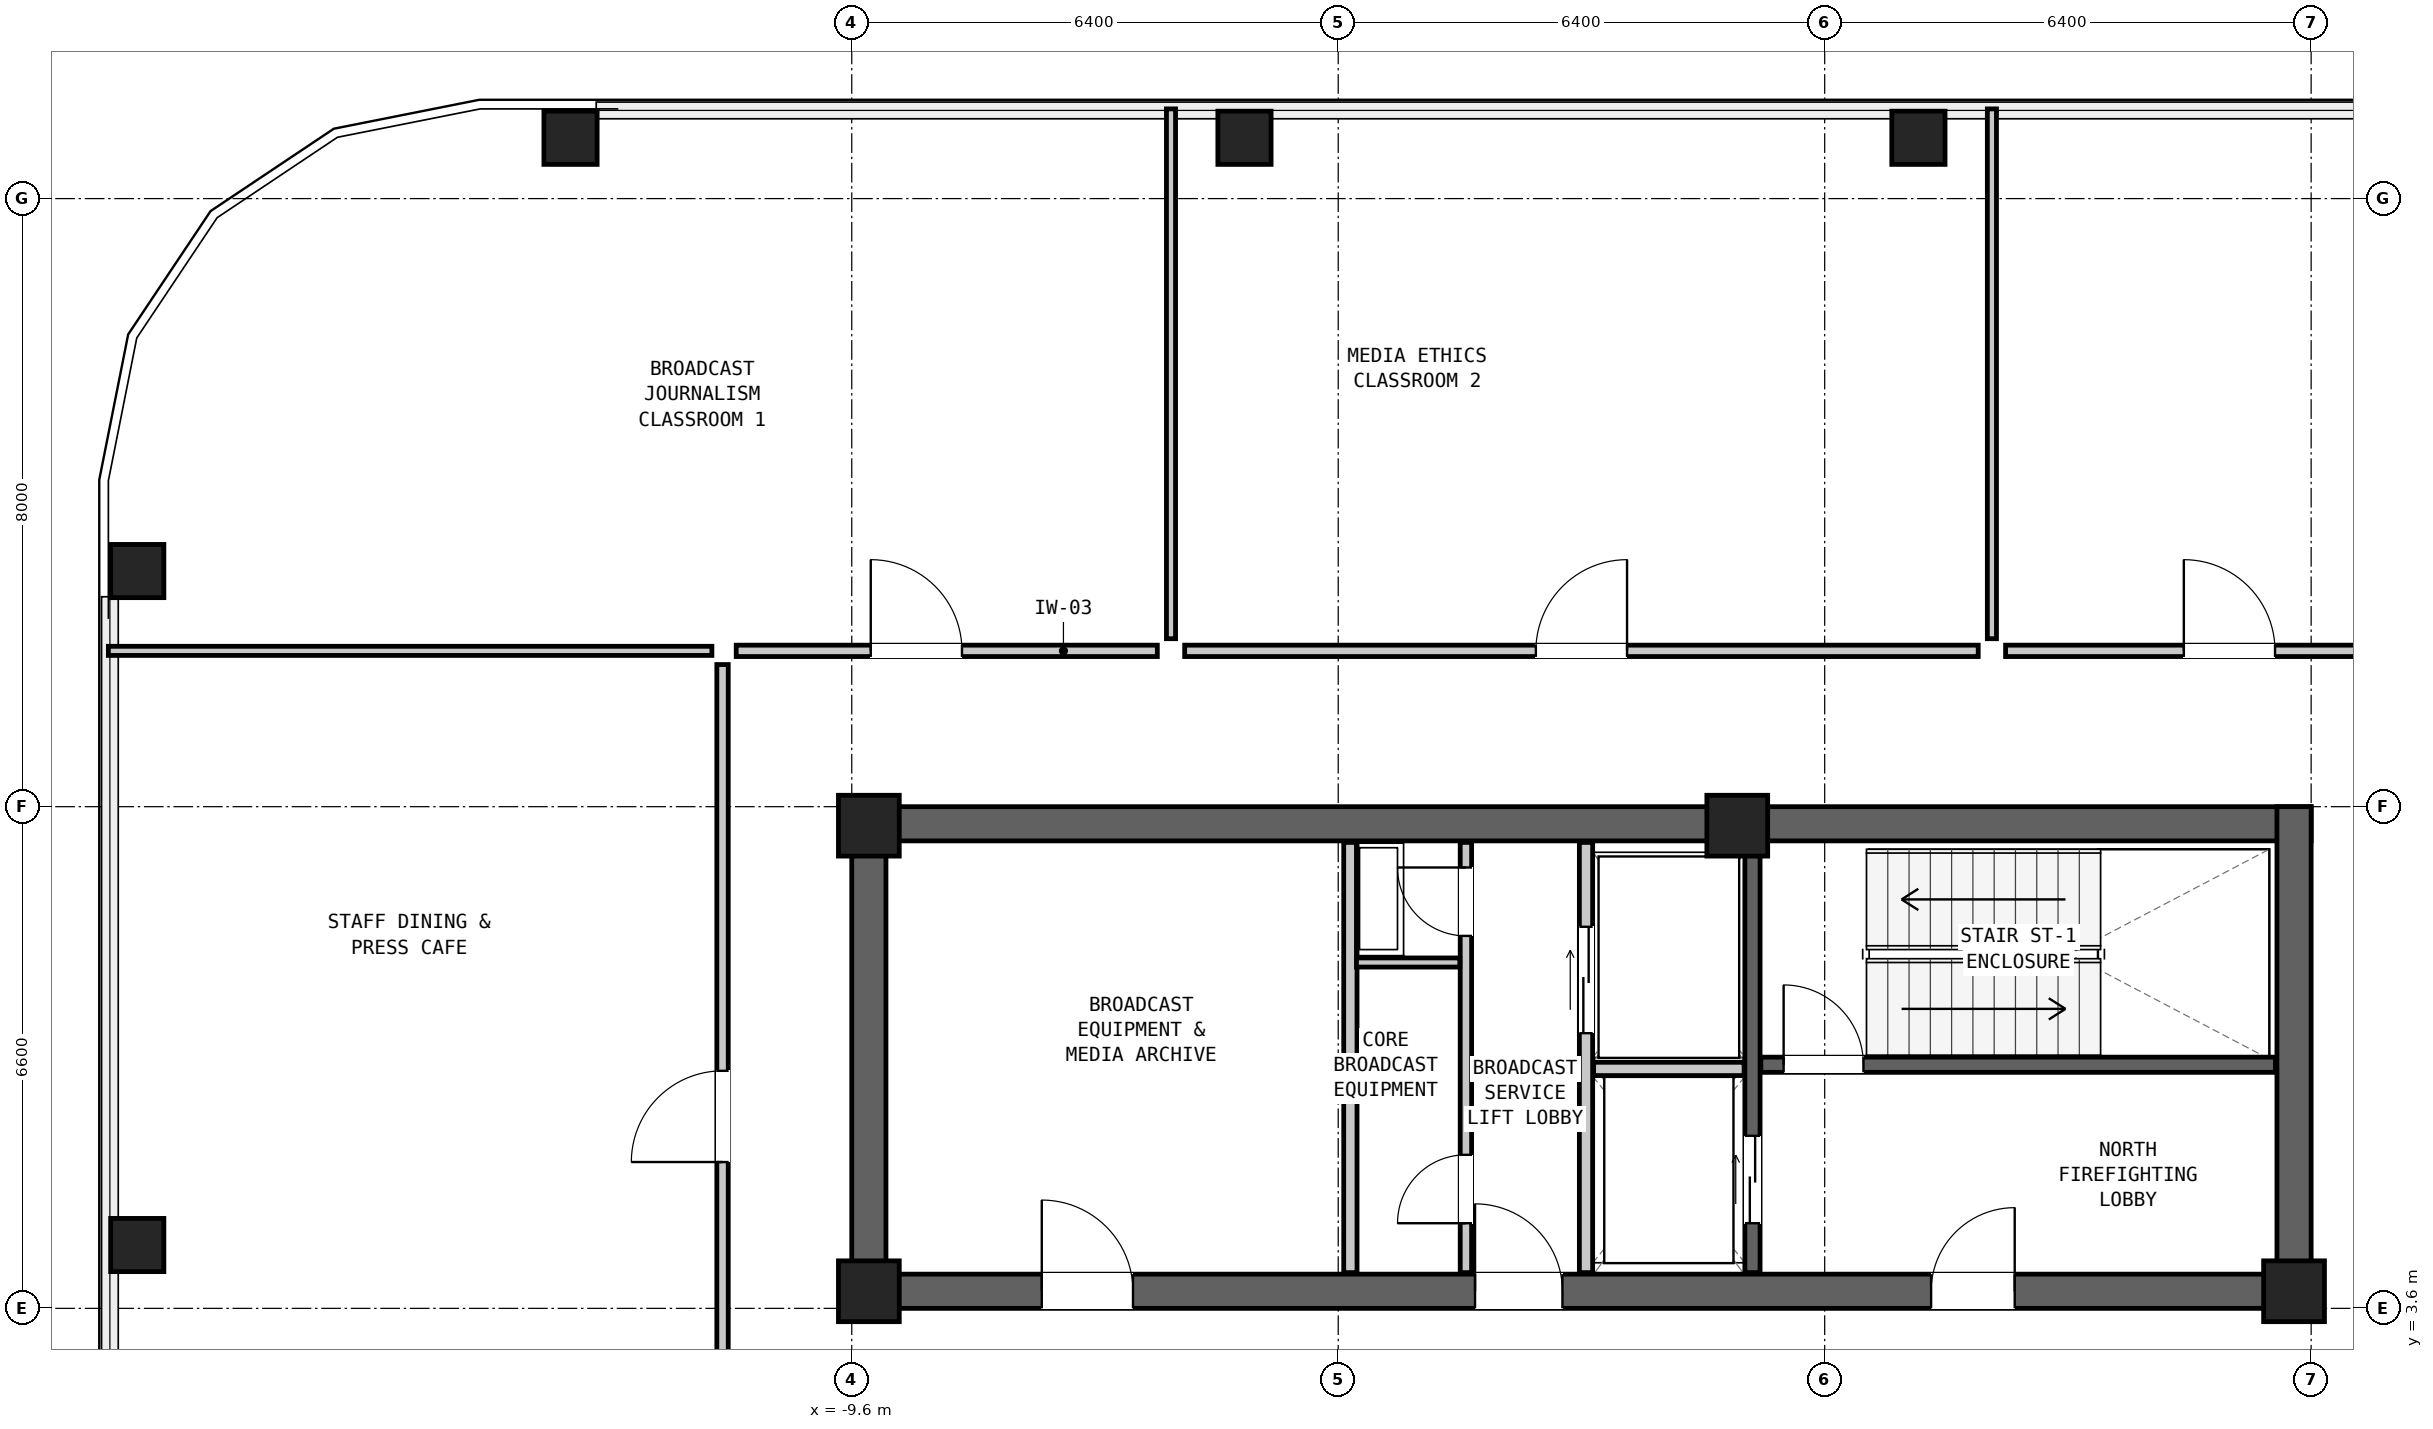
"""IFC4 building model, lengths in metres.
Left out: names, types, materials, properties, quantities, classifications, styles, units other than length and angle.
Written with IfcOpenShell. Run it as: python <this file> out.ifc"""

import sys

from ifc_helpers import new_model, si_unit, direction, frame, frame_2d, origin, origin_2d, place, context, subcontext, project, spatial, rectangle, hollow_rectangle, extrude, element, fill, save


model = new_model("IFC4")
c1 = context("Model", 3, precision=1e-05, world=origin(), true_north=direction((0.0, 1.0)))
c2 = subcontext(c1, "Body", "Model", "MODEL_VIEW")
j1 = project(units=[si_unit("LENGTHUNIT", "METRE"), si_unit("PLANEANGLEUNIT", "RADIAN")], contexts=[c1])
p1 = place(None, origin())
s1 = spatial("IfcSite", under=j1, at=p1, CompositionType="ELEMENT")
p2 = place(p1, origin())
s2 = spatial("IfcBuilding", under=s1, at=p2, CompositionType="ELEMENT")
p3 = place(p2, frame((0.0, 0.0, 226.95)))
s3 = spatial("IfcBuildingStorey", under=s2, at=p3, CompositionType="ELEMENT", Elevation=226.95)
p4 = place(p3, frame((-9.6, 9.975, 0.0), z_axis=(0.0, 0.0, 1.0), x_axis=(1.0, 0.0, 0.0)))
e1 = element("IfcWall", 1, at=p4, inside=s3, PredefinedType="SHEAR", context=c2, shape_type="SweptSolid", body=[
    extrude(rectangle(XDim=19.2, YDim=0.45, at=frame_2d((9.6, 0.0))), origin(), (0.0, 0.0, 1.0), 4.35),
])
p5 = place(p3, frame((-9.6, 3.825, 0.0), z_axis=(0.0, 0.0, 1.0), x_axis=(1.0, 0.0, 0.0)))
e2 = element("IfcWall", 2, at=p5, inside=s3, PredefinedType="SHEAR", context=c2, shape_type="SweptSolid", body=[
    extrude(rectangle(XDim=19.2, YDim=0.45, at=frame_2d((9.6, 0.0))), origin(), (0.0, 0.0, 1.0), 4.35),
])
p6 = place(p5, frame((14.2, 0.0, 0.0)))
e3 = element("IfcOpeningElement", 3, at=p6, cuts=e2, PredefinedType="OPENING", context=c2, shape_type="SweptSolid", body=[
    extrude(rectangle(XDim=1.1, YDim=2.08, at=frame_2d((0.55, 1.04))), frame((0.0, 0.237, 0.0), z_axis=(0.0, -1.0, 0.0), x_axis=(1.0, 0.0, 0.0)), (0.0, 0.0, 1.0), 0.474),
])
p7 = place(p5, frame((8.2, 0.0, 0.0)))
e4 = element("IfcOpeningElement", 4, at=p7, cuts=e2, PredefinedType="OPENING", context=c2, shape_type="SweptSolid", body=[
    extrude(rectangle(XDim=1.15, YDim=2.1, at=frame_2d((0.575, 1.05))), frame((0.0, 0.237, 0.0), z_axis=(0.0, -1.0, 0.0), x_axis=(1.0, 0.0, 0.0)), (0.0, 0.0, 1.0), 0.474),
])
p8 = place(p5, frame((2.5, 0.0, 0.0)))
e5 = element("IfcOpeningElement", 5, at=p8, cuts=e2, PredefinedType="OPENING", context=c2, shape_type="SweptSolid", body=[
    extrude(rectangle(XDim=1.2, YDim=2.1, at=frame_2d((0.6, 1.05))), frame((0.0, 0.237, 0.0), z_axis=(0.0, -1.0, 0.0), x_axis=(1.0, 0.0, 0.0)), (0.0, 0.0, 1.0), 0.474),
])
for number, where, z_axis, x_axis in (
    (6, (-9.375, 3.6, 0.0), (0.0, 0.0, 1.0), (0.0, 1.0, 0.0)),
    (7, (9.375, 3.6, 0.0), (0.0, 0.0, 1.0), (0.0, 1.0, 0.0)),
):
    element("IfcWall", number, at=place(p3, frame(where, z_axis=z_axis, x_axis=x_axis)), inside=s3, PredefinedType="SHEAR", context=c2, shape_type="SweptSolid", body=[
        extrude(rectangle(XDim=6.6, YDim=0.45, at=frame_2d((3.3, 0.0))), origin(), (0.0, 0.0, 1.0), 4.35),
    ])
for number, where, z_axis, x_axis in (
    (8, (4.433, 19.0, 0.0), (0.0, 0.0, 1.0), (1.0, 0.0, 0.0)),
    (9, (-4.433, 19.0, 0.0), (0.0, 0.0, 1.0), (1.0, 0.0, 0.0)),
    (10, (-13.3, 19.0, 0.0), (0.0, 0.0, 1.0), (1.0, 0.0, 0.0)),
    (11, (-19.0, 13.3, 0.0), (0.0, 0.0, 1.0), (0.0, 1.0, 0.0)),
    (12, (-19.0, 4.433, 0.0), (0.0, 0.0, 1.0), (0.0, 1.0, 0.0)),
):
    element("IfcColumn", number, at=place(p3, frame(where, z_axis=z_axis, x_axis=x_axis)), inside=s3, PredefinedType="COLUMN", context=c2, shape_type="SweptSolid", body=[
        extrude(hollow_rectangle(XDim=0.7, YDim=0.7, WallThickness=0.045, at=origin_2d()), origin(), (0.0, 0.0, 1.0), 4.35),
    ])
for number, where, z_axis, x_axis in (
    (13, (-9.375, 9.95, 0.0), (0.0, 0.0, 1.0), (1.0, 0.0, 0.0)),
    (14, (2.05, 9.95, 0.0), (0.0, 0.0, 1.0), (1.0, 0.0, 0.0)),
    (15, (-9.375, 3.825, 0.0), (0.0, 0.0, 1.0), (1.0, 0.0, 0.0)),
    (16, (9.375, 3.825, 0.0), (0.0, 0.0, 1.0), (1.0, 0.0, 0.0)),
):
    element("IfcColumn", number, at=place(p3, frame(where, z_axis=z_axis, x_axis=x_axis)), inside=s3, PredefinedType="COLUMN", context=c2, shape_type="SweptSolid", body=[
        extrude(rectangle(XDim=0.8, YDim=0.8, at=origin_2d()), origin(), (0.0, 0.0, 1.0), 4.35),
    ])
p9 = place(p3, frame((2.36, 6.805, 0.0), z_axis=(0.0, 0.0, 1.0), x_axis=(1.0, 0.0, 0.0)))
e17 = element("IfcWall", 17, at=p9, inside=s3, PredefinedType="SHEAR", context=c2, shape_type="SweptSolid", body=[
    extrude(rectangle(XDim=6.77, YDim=0.2, at=frame_2d((3.385, 0.0))), origin(), (0.0, 0.0, 1.0), 4.07),
])
p10 = place(p9, frame((0.3, 0.0, 0.0)))
e18 = element("IfcOpeningElement", 18, at=p10, cuts=e17, PredefinedType="OPENING", context=c2, shape_type="SweptSolid", body=[
    extrude(rectangle(XDim=1.05, YDim=2.08, at=frame_2d((0.525, 1.04))), frame((0.0, 0.112, 0.0), z_axis=(0.0, -1.0, 0.0), x_axis=(1.0, 0.0, 0.0)), (0.0, 0.0, 1.0), 0.224),
])
p11 = place(p3, frame((2.25, 4.07, 0.0), z_axis=(0.0, 0.0, 1.0), x_axis=(0.0, 1.0, 0.0)))
e19 = element("IfcWall", 19, at=p11, inside=s3, PredefinedType="SHEAR", context=c2, shape_type="SweptSolid", body=[
    extrude(rectangle(XDim=5.66, YDim=0.2, at=frame_2d((2.83, 0.0))), origin(), (0.0, 0.0, 1.0), 4.07),
])
p12 = place(p11, frame((0.65, 0.0, 0.0)))
e20 = element("IfcOpeningElement", 20, at=p12, cuts=e19, PredefinedType="OPENING", context=c2, shape_type="SweptSolid", body=[
    extrude(rectangle(XDim=1.15, YDim=2.08, at=frame_2d((0.575, 1.04))), frame((0.0, 0.112, 0.0), z_axis=(0.0, -1.0, 0.0), x_axis=(1.0, 0.0, 0.0)), (0.0, 0.0, 1.0), 0.224),
])
p13 = place(p3, frame((0.06, 4.07, 0.0), z_axis=(0.0, 0.0, 1.0), x_axis=(0.0, 1.0, 0.0)))
e21 = element("IfcWall", 21, at=p13, inside=s3, PredefinedType="PARTITIONING", context=c2, shape_type="SweptSolid", body=[
    extrude(rectangle(XDim=5.66, YDim=0.175, at=frame_2d((2.83, 0.0))), origin(), (0.0, 0.0, 1.0), 4.07),
])
p14 = place(p13, frame((3.15, 0.0, 0.0)))
e22 = element("IfcOpeningElement", 22, at=p14, cuts=e21, PredefinedType="OPENING", context=c2, shape_type="SweptSolid", body=[
    extrude(rectangle(XDim=1.4, YDim=2.12, at=frame_2d((0.7, 1.06))), frame((0.0, 0.1, 0.0), z_axis=(0.0, -1.0, 0.0), x_axis=(1.0, 0.0, 0.0)), (0.0, 0.0, 1.0), 0.199),
])
p15 = place(p3, frame((0.16, 6.75, 0.0), z_axis=(0.0, 0.0, 1.0), x_axis=(1.0, 0.0, 0.0)))
e23 = element("IfcWall", 23, at=p15, inside=s3, PredefinedType="PARTITIONING", context=c2, shape_type="SweptSolid", body=[
    extrude(rectangle(XDim=1.98, YDim=0.175, at=frame_2d((0.99, 0.0))), origin(), (0.0, 0.0, 1.0), 4.07),
])
p16 = place(p3, frame((-3.04, 4.07, 0.0), z_axis=(0.0, 0.0, 1.0), x_axis=(0.0, 1.0, 0.0)))
e24 = element("IfcWall", 24, at=p16, inside=s3, PredefinedType="PARTITIONING", context=c2, shape_type="SweptSolid", body=[
    extrude(rectangle(XDim=5.66, YDim=0.175, at=frame_2d((2.83, 0.0))), origin(), (0.0, 0.0, 1.0), 4.07),
])
p17 = place(p3, frame((-1.52, 4.07, 0.0), z_axis=(0.0, 0.0, 1.0), x_axis=(0.0, 1.0, 0.0)))
e25 = element("IfcWall", 25, at=p17, inside=s3, PredefinedType="PARTITIONING", context=c2, shape_type="SweptSolid", body=[
    extrude(rectangle(XDim=5.66, YDim=0.15, at=frame_2d((2.83, 0.0))), origin(), (0.0, 0.0, 1.0), 4.07),
])
p18 = place(p17, frame((4.43, 0.0, 0.0)))
e26 = element("IfcOpeningElement", 26, at=p18, cuts=e25, PredefinedType="OPENING", context=c2, shape_type="SweptSolid", body=[
    extrude(rectangle(XDim=0.9, YDim=2.05, at=frame_2d((0.45, 1.025))), frame((0.0, 0.087, 0.0), z_axis=(0.0, -1.0, 0.0), x_axis=(1.0, 0.0, 0.0)), (0.0, 0.0, 1.0), 0.174),
])
p19 = place(p17, frame((0.65, 0.0, 0.0)))
e27 = element("IfcOpeningElement", 27, at=p19, cuts=e25, PredefinedType="OPENING", context=c2, shape_type="SweptSolid", body=[
    extrude(rectangle(XDim=0.9, YDim=2.05, at=frame_2d((0.45, 1.025))), frame((0.0, 0.087, 0.0), z_axis=(0.0, -1.0, 0.0), x_axis=(1.0, 0.0, 0.0)), (0.0, 0.0, 1.0), 0.174),
])
p20 = place(p3, frame((-2.96, 8.15, 0.0), z_axis=(0.0, 0.0, 1.0), x_axis=(1.0, 0.0, 0.0)))
e28 = element("IfcWall", 28, at=p20, inside=s3, PredefinedType="PARTITIONING", context=c2, shape_type="SweptSolid", body=[
    extrude(rectangle(XDim=1.36, YDim=0.12, at=frame_2d((0.68, 0.0))), origin(), (0.0, 0.0, 1.0), 4.07),
])
p21 = place(p3, frame((-19.38, 12.25, 0.0), z_axis=(0.0, 0.0, 1.0), x_axis=(1.0, 0.0, 0.0)))
e29 = element("IfcWall", 29, at=p21, inside=s3, PredefinedType="PARTITIONING", context=c2, shape_type="SweptSolid", body=[
    extrude(rectangle(XDim=7.94, YDim=0.12, at=frame_2d((3.97, 0.0))), origin(), (0.0, 0.0, 1.0), 4.07),
])
for number, where, z_axis, x_axis in (
    (30, (-5.4, 12.41, 0.0), (0.0, 0.0, 1.0), (0.0, 1.0, 0.0)),
    (31, (5.4, 12.41, 0.0), (0.0, 0.0, 1.0), (0.0, 1.0, 0.0)),
):
    element("IfcWall", number, at=place(p3, frame(where, z_axis=z_axis, x_axis=x_axis)), inside=s3, PredefinedType="PARTITIONING", context=c2, shape_type="SweptSolid", body=[
        extrude(rectangle(XDim=6.97, YDim=0.12, at=frame_2d((3.485, 0.0))), origin(), (0.0, 0.0, 1.0), 4.07),
    ])
p22 = place(p3, frame((-11.12, 12.25, 0.0), z_axis=(0.0, 0.0, 1.0), x_axis=(1.0, 0.0, 0.0)))
e32 = element("IfcWall", 32, at=p22, inside=s3, PredefinedType="PARTITIONING", context=c2, shape_type="SweptSolid", body=[
    extrude(rectangle(XDim=5.54, YDim=0.15, at=frame_2d((2.77, 0.0))), origin(), (0.0, 0.0, 1.0), 2.25),
])
p23 = place(p22, frame((1.77, 0.0, 0.0)))
e33 = element("IfcOpeningElement", 33, at=p23, cuts=e32, PredefinedType="OPENING", context=c2, shape_type="SweptSolid", body=[
    extrude(rectangle(XDim=1.2, YDim=2.1, at=frame_2d((0.6, 1.05))), frame((0.0, 0.087, 0.0), z_axis=(0.0, -1.0, 0.0), x_axis=(1.0, 0.0, 0.0)), (0.0, 0.0, 1.0), 0.174),
])
p24 = place(p3, frame((-5.22, 12.25, 0.0), z_axis=(0.0, 0.0, 1.0), x_axis=(1.0, 0.0, 0.0)))
e34 = element("IfcWall", 34, at=p24, inside=s3, PredefinedType="PARTITIONING", context=c2, shape_type="SweptSolid", body=[
    extrude(rectangle(XDim=10.44, YDim=0.15, at=frame_2d((5.22, 0.0))), origin(), (0.0, 0.0, 1.0), 2.25),
])
p25 = place(p24, frame((4.62, 0.0, 0.0)))
e35 = element("IfcOpeningElement", 35, at=p25, cuts=e34, PredefinedType="OPENING", context=c2, shape_type="SweptSolid", body=[
    extrude(rectangle(XDim=1.2, YDim=2.1, at=frame_2d((0.6, 1.05))), frame((0.0, 0.087, 0.0), z_axis=(0.0, -1.0, 0.0), x_axis=(1.0, 0.0, 0.0)), (0.0, 0.0, 1.0), 0.174),
])
p26 = place(p3, frame((5.58, 12.25, 0.0), z_axis=(0.0, 0.0, 1.0), x_axis=(1.0, 0.0, 0.0)))
e36 = element("IfcWall", 36, at=p26, inside=s3, PredefinedType="PARTITIONING", context=c2, shape_type="SweptSolid", body=[
    extrude(rectangle(XDim=5.89, YDim=0.15, at=frame_2d((2.945, 0.0))), origin(), (0.0, 0.0, 1.0), 2.25),
])
p27 = place(p26, frame((2.345, 0.0, 0.0)))
e37 = element("IfcOpeningElement", 37, at=p27, cuts=e36, PredefinedType="OPENING", context=c2, shape_type="SweptSolid", body=[
    extrude(rectangle(XDim=1.2, YDim=2.1, at=frame_2d((0.6, 1.05))), frame((0.0, 0.087, 0.0), z_axis=(0.0, -1.0, 0.0), x_axis=(1.0, 0.0, 0.0)), (0.0, 0.0, 1.0), 0.174),
])
p28 = place(p3, frame((-11.3, 0.18, 0.0), z_axis=(0.0, 0.0, 1.0), x_axis=(0.0, 1.0, 0.0)))
e38 = element("IfcWall", 38, at=p28, inside=s3, PredefinedType="PARTITIONING", context=c2, shape_type="SweptSolid", body=[
    extrude(rectangle(XDim=11.89, YDim=0.15, at=frame_2d((5.945, 0.0))), origin(), (0.0, 0.0, 1.0), 4.07),
])
p29 = place(p28, frame((5.345, 0.0, 0.0)))
e39 = element("IfcOpeningElement", 39, at=p29, cuts=e38, PredefinedType="OPENING", context=c2, shape_type="SweptSolid", body=[
    extrude(rectangle(XDim=1.2, YDim=2.1, at=frame_2d((0.6, 1.05))), frame((0.0, 0.087, 0.0), z_axis=(0.0, -1.0, 0.0), x_axis=(1.0, 0.0, 0.0)), (0.0, 0.0, 1.0), 0.174),
])
p30 = place(p10, origin())
e40 = element("IfcDoor", 40, at=p30, inside=s3, OperationType="SINGLE_SWING_LEFT", PredefinedType="DOOR", context=c2, shape_type="SweptSolid", body=[
    extrude(rectangle(XDim=1.05, YDim=2.08, at=frame_2d((0.525, 1.04))), frame((0.0, 0.025, 0.0), z_axis=(0.0, -1.0, 0.0), x_axis=(1.0, 0.0, 0.0)), (0.0, 0.0, 1.0), 0.05),
])
fill(e18, e40)
p31 = place(p6, origin())
e41 = element("IfcDoor", 41, at=p31, inside=s3, OperationType="SINGLE_SWING_RIGHT", PredefinedType="DOOR", context=c2, shape_type="SweptSolid", body=[
    extrude(rectangle(XDim=1.1, YDim=2.08, at=frame_2d((0.55, 1.04))), frame((0.0, 0.025, 0.0), z_axis=(0.0, -1.0, 0.0), x_axis=(1.0, 0.0, 0.0)), (0.0, 0.0, 1.0), 0.05),
])
fill(e3, e41)
p32 = place(p12, origin())
e42 = element("IfcDoor", 42, at=p32, inside=s3, OperationType="DOUBLE_DOOR_SLIDING", PredefinedType="DOOR", context=c2, shape_type="SweptSolid", body=[
    extrude(rectangle(XDim=1.15, YDim=2.08, at=frame_2d((0.575, 1.04))), frame((0.0, 0.025, 0.0), z_axis=(0.0, -1.0, 0.0), x_axis=(1.0, 0.0, 0.0)), (0.0, 0.0, 1.0), 0.05),
])
fill(e20, e42)
p33 = place(p14, origin())
e43 = element("IfcDoor", 43, at=p33, inside=s3, OperationType="DOUBLE_DOOR_SLIDING", PredefinedType="DOOR", context=c2, shape_type="SweptSolid", body=[
    extrude(rectangle(XDim=1.4, YDim=2.12, at=frame_2d((0.7, 1.06))), frame((0.0, 0.025, 0.0), z_axis=(0.0, -1.0, 0.0), x_axis=(1.0, 0.0, 0.0)), (0.0, 0.0, 1.0), 0.05),
])
fill(e22, e43)
p34 = place(p7, origin())
e44 = element("IfcDoor", 44, at=p34, inside=s3, OperationType="SINGLE_SWING_LEFT", PredefinedType="DOOR", context=c2, shape_type="SweptSolid", body=[
    extrude(rectangle(XDim=1.15, YDim=2.1, at=frame_2d((0.575, 1.05))), frame((0.0, 0.025, 0.0), z_axis=(0.0, -1.0, 0.0), x_axis=(1.0, 0.0, 0.0)), (0.0, 0.0, 1.0), 0.05),
])
fill(e4, e44)
p35 = place(p18, origin())
e45 = element("IfcDoor", 45, at=p35, inside=s3, OperationType="SINGLE_SWING_RIGHT", PredefinedType="DOOR", context=c2, shape_type="SweptSolid", body=[
    extrude(rectangle(XDim=0.9, YDim=2.05, at=frame_2d((0.45, 1.025))), frame((0.0, 0.025, 0.0), z_axis=(0.0, -1.0, 0.0), x_axis=(1.0, 0.0, 0.0)), (0.0, 0.0, 1.0), 0.05),
])
fill(e26, e45)
p36 = place(p19, origin())
e46 = element("IfcDoor", 46, at=p36, inside=s3, OperationType="SINGLE_SWING_LEFT", PredefinedType="DOOR", context=c2, shape_type="SweptSolid", body=[
    extrude(rectangle(XDim=0.9, YDim=2.05, at=frame_2d((0.45, 1.025))), frame((0.0, 0.025, 0.0), z_axis=(0.0, -1.0, 0.0), x_axis=(1.0, 0.0, 0.0)), (0.0, 0.0, 1.0), 0.05),
])
fill(e27, e46)
p37 = place(p8, origin())
e47 = element("IfcDoor", 47, at=p37, inside=s3, OperationType="SINGLE_SWING_LEFT", PredefinedType="DOOR", context=c2, shape_type="SweptSolid", body=[
    extrude(rectangle(XDim=1.2, YDim=2.1, at=frame_2d((0.6, 1.05))), frame((0.0, 0.025, 0.0), z_axis=(0.0, -1.0, 0.0), x_axis=(1.0, 0.0, 0.0)), (0.0, 0.0, 1.0), 0.05),
])
fill(e5, e47)
p38 = place(p23, origin())
e48 = element("IfcDoor", 48, at=p38, inside=s3, OperationType="SINGLE_SWING_LEFT", PredefinedType="DOOR", context=c2, shape_type="SweptSolid", body=[
    extrude(rectangle(XDim=1.2, YDim=2.1, at=frame_2d((0.6, 1.05))), frame((0.0, 0.025, 0.0), z_axis=(0.0, -1.0, 0.0), x_axis=(1.0, 0.0, 0.0)), (0.0, 0.0, 1.0), 0.05),
])
fill(e33, e48)
p39 = place(p25, origin())
e49 = element("IfcDoor", 49, at=p39, inside=s3, OperationType="SINGLE_SWING_RIGHT", PredefinedType="DOOR", context=c2, shape_type="SweptSolid", body=[
    extrude(rectangle(XDim=1.2, YDim=2.1, at=frame_2d((0.6, 1.05))), frame((0.0, 0.025, 0.0), z_axis=(0.0, -1.0, 0.0), x_axis=(1.0, 0.0, 0.0)), (0.0, 0.0, 1.0), 0.05),
])
fill(e35, e49)
p40 = place(p27, origin())
e50 = element("IfcDoor", 50, at=p40, inside=s3, OperationType="SINGLE_SWING_LEFT", PredefinedType="DOOR", context=c2, shape_type="SweptSolid", body=[
    extrude(rectangle(XDim=1.2, YDim=2.1, at=frame_2d((0.6, 1.05))), frame((0.0, 0.025, 0.0), z_axis=(0.0, -1.0, 0.0), x_axis=(1.0, 0.0, 0.0)), (0.0, 0.0, 1.0), 0.05),
])
fill(e37, e50)
p41 = place(p29, origin())
e51 = element("IfcDoor", 51, at=p41, inside=s3, OperationType="SINGLE_SWING_LEFT", PredefinedType="DOOR", context=c2, shape_type="SweptSolid", body=[
    extrude(rectangle(XDim=1.2, YDim=2.1, at=frame_2d((0.6, 1.05))), frame((0.0, 0.025, 0.0), z_axis=(0.0, -1.0, 0.0), x_axis=(1.0, 0.0, 0.0)), (0.0, 0.0, 1.0), 0.05),
])
fill(e39, e51)
save(model, sys.argv[1])
